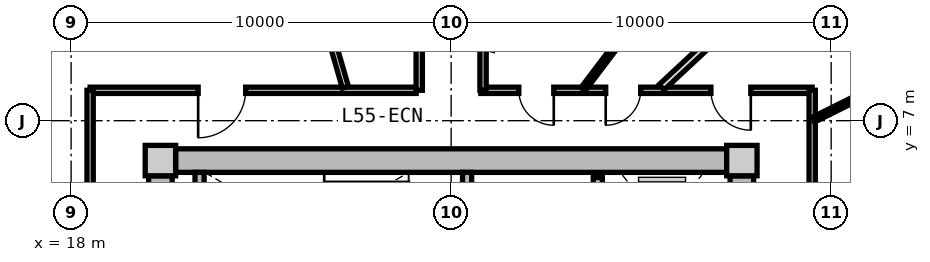
"""IFC4 building model, lengths in metres.
Left out: names, types, materials, properties, quantities, classifications, styles, units other than length and angle.
Written with IfcOpenShell. Run it as: python <this file> out.ifc"""

import sys

from ifc_helpers import new_model, si_unit, direction, frame, frame_2d, origin, origin_2d, place, context, subcontext, project, spatial, rectangle, extrude, source, transform, mapped, element, fill, save


model = new_model("IFC4")
c1 = context("Model", 3, precision=1e-05, world=origin(), true_north=direction((0.0, 1.0)))
c2 = subcontext(c1, "Body", "Model", "MODEL_VIEW")
j1 = project(units=[si_unit("LENGTHUNIT", "METRE"), si_unit("PLANEANGLEUNIT", "RADIAN")], contexts=[c1])
p1 = place(None, origin())
s1 = spatial("IfcSite", under=j1, at=p1, CompositionType="ELEMENT")
p2 = place(p1, origin())
s2 = spatial("IfcBuilding", under=s1, at=p2, CompositionType="ELEMENT")
p3 = place(p2, frame((0.0, 0.0, 177.0)))
s3 = spatial("IfcBuildingStorey", under=s2, at=p3, CompositionType="ELEMENT", Elevation=177.0)
m1 = source(origin(), c2, "Body", "SweptSolid", [
    extrude(rectangle(XDim=0.8, YDim=0.8, at=origin_2d()), origin(), (0.0, 0.0, 1.0), 3.05),
])
for number, where, z_axis, x_axis in (
    (1, (35.65, 5.95, 0.0), (0.0, 0.0, 1.0), (1.0, 0.0, 0.0)),
    (2, (20.35, 5.95, 0.0), (0.0, 0.0, 1.0), (1.0, 0.0, 0.0)),
):
    element("IfcColumn", number, at=place(p3, frame(where, z_axis=z_axis, x_axis=x_axis)), inside=s3, PredefinedType="COLUMN", context=c2, shape_type="MappedRepresentation", body=[
        mapped(m1, transform((0.0, 0.0, 0.0), x_axis=(1.0, 0.0, 0.0), y_axis=(0.0, 1.0, 0.0), z_axis=(0.0, 0.0, 1.0), scale=1.0)),
    ])
m2 = source(origin(), c2, "Body", "SweptSolid", [
    extrude(rectangle(XDim=14.5, YDim=0.62, at=frame_2d((7.25, 0.0))), origin(), (0.0, 0.0, 1.0), 2.81),
])
p4 = place(p3, frame((20.75, 5.95, 0.0), z_axis=(0.0, 0.0, 1.0), x_axis=(1.0, 0.0, 0.0)))
e3 = element("IfcWall", 3, at=p4, inside=s3, PredefinedType="SHEAR", context=c2, shape_type="MappedRepresentation", body=[
    mapped(m2, transform((0.0, 0.0, 0.0), x_axis=(1.0, 0.0, 0.0), y_axis=(0.0, 1.0, 0.0), z_axis=(0.0, 0.0, 1.0), scale=1.0)),
])
m3 = source(origin(), c2, "Body", "SweptSolid", [
    extrude(rectangle(XDim=11.1, YDim=0.62, at=frame_2d((5.55, 0.0))), origin(), (0.0, 0.0, 1.0), 2.81),
])
p5 = place(p3, frame((20.35, -5.55, 0.0), z_axis=(0.0, 0.0, 1.0), x_axis=(0.0, 1.0, 0.0)))
e4 = element("IfcWall", 4, at=p5, inside=s3, PredefinedType="SHEAR", context=c2, shape_type="MappedRepresentation", body=[
    mapped(m3, transform((0.0, 0.0, 0.0), x_axis=(1.0, 0.0, 0.0), y_axis=(0.0, 1.0, 0.0), z_axis=(0.0, 0.0, 1.0), scale=1.0)),
])
p6 = place(p5, frame((3.8, 0.0, 0.0)))
e5 = element("IfcOpeningElement", 5, at=p6, cuts=e4, PredefinedType="OPENING", context=c2, shape_type="SweptSolid", body=[
    extrude(rectangle(XDim=1.2, YDim=2.15, at=frame_2d((0.6, 1.075))), frame((0.0, 0.32, 0.0), z_axis=(0.0, -1.0, 0.0), x_axis=(1.0, 0.0, 0.0)), (0.0, 0.0, 1.0), 0.64),
])
p7 = place(p3, frame((35.65, 5.55, 0.0), z_axis=(0.0, 0.0, 1.0), x_axis=(0.0, -1.0, 0.0)))
e6 = element("IfcWall", 6, at=p7, inside=s3, PredefinedType="SHEAR", context=c2, shape_type="MappedRepresentation", body=[
    mapped(m3, transform((0.0, 0.0, 0.0), x_axis=(1.0, 0.0, 0.0), y_axis=(0.0, 1.0, 0.0), z_axis=(0.0, 0.0, 1.0), scale=1.0)),
])
p8 = place(p7, frame((5.65, 0.0, 0.0)))
e7 = element("IfcOpeningElement", 7, at=p8, cuts=e6, PredefinedType="OPENING", context=c2, shape_type="SweptSolid", body=[
    extrude(rectangle(XDim=1.2, YDim=2.15, at=frame_2d((0.6, 1.075))), frame((0.0, 0.32, 0.0), z_axis=(0.0, -1.0, 0.0), x_axis=(1.0, 0.0, 0.0)), (0.0, 0.0, 1.0), 0.64),
])
m4 = source(origin(), c2, "Body", "SweptSolid", [
    extrude(rectangle(XDim=3.19, YDim=0.24, at=frame_2d((1.595, 0.0))), origin(), (0.0, 0.0, 1.0), 2.81),
])
p9 = place(p3, frame((21.38, 2.45, 0.0), z_axis=(0.0, 0.0, 1.0), x_axis=(0.0, 1.0, 0.0)))
e8 = element("IfcWall", 8, at=p9, inside=s3, PredefinedType="PARTITIONING", context=c2, shape_type="MappedRepresentation", body=[
    mapped(m4, transform((0.0, 0.0, 0.0), x_axis=(1.0, 0.0, 0.0), y_axis=(0.0, 1.0, 0.0), z_axis=(0.0, 0.0, 1.0), scale=1.0)),
])
p10 = place(p3, frame((28.42, 2.45, 0.0), z_axis=(0.0, 0.0, 1.0), x_axis=(0.0, 1.0, 0.0)))
e9 = element("IfcWall", 9, at=p10, inside=s3, PredefinedType="PARTITIONING", context=c2, shape_type="MappedRepresentation", body=[
    mapped(m4, transform((0.0, 0.0, 0.0), x_axis=(1.0, 0.0, 0.0), y_axis=(0.0, 1.0, 0.0), z_axis=(0.0, 0.0, 1.0), scale=1.0)),
])
p11 = place(p10, frame((0.55, 0.0, 0.0)))
e10 = element("IfcOpeningElement", 10, at=p11, cuts=e9, PredefinedType="OPENING", context=c2, shape_type="SweptSolid", body=[
    extrude(rectangle(XDim=1.1, YDim=2.15, at=frame_2d((0.55, 1.075))), frame((0.0, 0.13, 0.0), z_axis=(0.0, -1.0, 0.0), x_axis=(1.0, 0.0, 0.0)), (0.0, 0.0, 1.0), 0.26),
])
m5 = source(origin(), c2, "Body", "SweptSolid", [
    extrude(rectangle(XDim=5.0, YDim=0.24, at=frame_2d((2.5, 0.0))), origin(), (0.0, 0.0, 1.0), 2.795),
])
p12 = place(p3, frame((31.86, 0.5, 0.0), z_axis=(0.0, 0.0, 1.0), x_axis=(0.0, 1.0, 0.0)))
e11 = element("IfcWall", 11, at=p12, inside=s3, PredefinedType="PARTITIONING", context=c2, shape_type="MappedRepresentation", body=[
    mapped(m5, transform((0.0, 0.0, 0.0), x_axis=(1.0, 0.0, 0.0), y_axis=(0.0, 1.0, 0.0), z_axis=(0.0, 0.0, 1.0), scale=1.0)),
])
p13 = place(p12, frame((3.05, 0.0, 0.0)))
e12 = element("IfcOpeningElement", 12, at=p13, cuts=e11, PredefinedType="OPENING", context=c2, shape_type="SweptSolid", body=[
    extrude(rectangle(XDim=1.3, YDim=2.2, at=frame_2d((0.65, 1.1))), frame((0.0, 0.13, 0.0), z_axis=(0.0, -1.0, 0.0), x_axis=(1.0, 0.0, 0.0)), (0.0, 0.0, 1.0), 0.26),
])
p14 = place(p12, frame((0.55, 0.0, 0.0)))
e13 = element("IfcOpeningElement", 13, at=p14, cuts=e11, PredefinedType="OPENING", context=c2, shape_type="SweptSolid", body=[
    extrude(rectangle(XDim=1.3, YDim=2.2, at=frame_2d((0.65, 1.1))), frame((0.0, 0.13, 0.0), z_axis=(0.0, -1.0, 0.0), x_axis=(1.0, 0.0, 0.0)), (0.0, 0.0, 1.0), 0.26),
])
m6 = source(origin(), c2, "Body", "SweptSolid", [
    extrude(rectangle(XDim=8.58, YDim=0.165, at=frame_2d((4.29, 0.0))), origin(), (0.0, 0.0, 1.0), 2.795),
])
p15 = place(p3, frame((18.5, 7.8, 0.0), z_axis=(0.0, 0.0, 1.0), x_axis=(1.0, 0.0, 0.0)))
e14 = element("IfcWall", 14, at=p15, inside=s3, PredefinedType="PARTITIONING", context=c2, shape_type="MappedRepresentation", body=[
    mapped(m6, transform((0.0, 0.0, 0.0), x_axis=(1.0, 0.0, 0.0), y_axis=(0.0, 1.0, 0.0), z_axis=(0.0, 0.0, 1.0), scale=1.0)),
])
p16 = place(p15, frame((2.843, 0.0, 0.0)))
e15 = element("IfcOpeningElement", 15, at=p16, cuts=e14, PredefinedType="OPENING", context=c2, shape_type="SweptSolid", body=[
    extrude(rectangle(XDim=1.25, YDim=2.2, at=frame_2d((0.625, 1.1))), frame((0.0, 0.093, 0.0), z_axis=(0.0, -1.0, 0.0), x_axis=(1.0, 0.0, 0.0)), (0.0, 0.0, 1.0), 0.185),
])
m7 = source(origin(), c2, "Body", "SweptSolid", [
    extrude(rectangle(XDim=8.719, YDim=0.165, at=frame_2d((4.36, 0.0))), origin(), (0.0, 0.0, 1.0), 2.795),
])
p17 = place(p3, frame((28.781, 7.8, 0.0), z_axis=(0.0, 0.0, 1.0), x_axis=(1.0, 0.0, 0.0)))
e16 = element("IfcWall", 16, at=p17, inside=s3, PredefinedType="PARTITIONING", context=c2, shape_type="MappedRepresentation", body=[
    mapped(m7, transform((0.0, 0.0, 0.0), x_axis=(1.0, 0.0, 0.0), y_axis=(0.0, 1.0, 0.0), z_axis=(0.0, 0.0, 1.0), scale=1.0)),
])
p18 = place(p17, frame((6.054, 0.0, 0.0)))
e17 = element("IfcOpeningElement", 17, at=p18, cuts=e16, PredefinedType="OPENING", context=c2, shape_type="SweptSolid", body=[
    extrude(rectangle(XDim=1.05, YDim=2.15, at=frame_2d((0.525, 1.075))), frame((0.0, 0.093, 0.0), z_axis=(0.0, -1.0, 0.0), x_axis=(1.0, 0.0, 0.0)), (0.0, 0.0, 1.0), 0.185),
])
p19 = place(p17, frame((3.287, 0.0, 0.0)))
e18 = element("IfcOpeningElement", 18, at=p19, cuts=e16, PredefinedType="OPENING", context=c2, shape_type="SweptSolid", body=[
    extrude(rectangle(XDim=0.92, YDim=2.1, at=frame_2d((0.46, 1.05))), frame((0.0, 0.093, 0.0), z_axis=(0.0, -1.0, 0.0), x_axis=(1.0, 0.0, 0.0)), (0.0, 0.0, 1.0), 0.185),
])
p20 = place(p17, frame((1.0, 0.0, 0.0)))
e19 = element("IfcOpeningElement", 19, at=p20, cuts=e16, PredefinedType="OPENING", context=c2, shape_type="SweptSolid", body=[
    extrude(rectangle(XDim=0.92, YDim=2.1, at=frame_2d((0.46, 1.05))), frame((0.0, 0.093, 0.0), z_axis=(0.0, -1.0, 0.0), x_axis=(1.0, 0.0, 0.0)), (0.0, 0.0, 1.0), 0.185),
])
m8 = source(origin(), c2, "Body", "SweptSolid", [
    extrude(rectangle(XDim=6.88, YDim=0.165, at=frame_2d((3.44, 0.0))), origin(), (0.0, 0.0, 1.0), 2.795),
])
for number, where, z_axis, x_axis in (
    (20, (18.5, 0.92, 0.0), (0.0, 0.0, 1.0), (0.0, 1.0, 0.0)),
    (21, (37.5, 7.8, 0.0), (0.0, 0.0, 1.0), (0.0, -1.0, 0.0)),
):
    element("IfcWall", number, at=place(p3, frame(where, z_axis=z_axis, x_axis=x_axis)), inside=s3, PredefinedType="PARTITIONING", context=c2, shape_type="MappedRepresentation", body=[
        mapped(m8, transform((0.0, 0.0, 0.0), x_axis=(1.0, 0.0, 0.0), y_axis=(0.0, 1.0, 0.0), z_axis=(0.0, 0.0, 1.0), scale=1.0)),
    ])
m9 = source(origin(), c2, "Body", "SweptSolid", [
    extrude(rectangle(XDim=9.73, YDim=0.165, at=frame_2d((4.865, 0.0))), origin(), (0.0, 0.0, 1.0), 2.345),
])
p21 = place(p3, frame((25.217, 7.88, 0.0), z_axis=(0.0, 0.0, 1.0), x_axis=(-0.27679492614, 0.960929013436, 0.0)))
e22 = element("IfcWall", 22, at=p21, inside=s3, PredefinedType="PARTITIONING", context=c2, shape_type="MappedRepresentation", body=[
    mapped(m9, transform((0.0, 0.0, 0.0), x_axis=(1.0, 0.0, 0.0), y_axis=(0.0, 1.0, 0.0), z_axis=(0.0, 0.0, 1.0), scale=1.0)),
])
m10 = source(origin(), c2, "Body", "SweptSolid", [
    extrude(rectangle(XDim=8.305, YDim=0.165, at=frame_2d((4.153, 0.0))), origin(), (0.0, 0.0, 1.0), 2.345),
])
p22 = place(p3, frame((18.42, 3.908, 0.0), z_axis=(0.0, 0.0, 1.0), x_axis=(-0.970309994378, 0.241864662175, 0.0)))
e23 = element("IfcWall", 23, at=p22, inside=s3, PredefinedType="PARTITIONING", context=c2, shape_type="MappedRepresentation", body=[
    mapped(m10, transform((0.0, 0.0, 0.0), x_axis=(1.0, 0.0, 0.0), y_axis=(0.0, 1.0, 0.0), z_axis=(0.0, 0.0, 1.0), scale=1.0)),
])
m11 = source(origin(), c2, "Body", "SweptSolid", [
    extrude(rectangle(XDim=6.193, YDim=0.165, at=frame_2d((3.096, 0.0))), origin(), (0.0, 0.0, 1.0), 2.345),
])
p23 = place(p3, frame((37.58, 4.419, 0.0), z_axis=(0.0, 0.0, 1.0), x_axis=(0.970309243466, 0.241867674657, 0.0)))
e24 = element("IfcWall", 24, at=p23, inside=s3, PredefinedType="PARTITIONING", context=c2, shape_type="MappedRepresentation", body=[
    mapped(m11, transform((0.0, 0.0, 0.0), x_axis=(1.0, 0.0, 0.0), y_axis=(0.0, 1.0, 0.0), z_axis=(0.0, 0.0, 1.0), scale=1.0)),
])
m12 = source(origin(), c2, "Body", "SweptSolid", [
    extrude(rectangle(XDim=9.48, YDim=0.165, at=frame_2d((4.74, 0.0))), origin(), (0.0, 0.0, 1.0), 2.795),
])
p24 = place(p3, frame((27.16, 7.8, 0.0), z_axis=(0.0, 0.0, 1.0), x_axis=(0.0, 1.0, 0.0)))
e25 = element("IfcWall", 25, at=p24, inside=s3, PredefinedType="PARTITIONING", context=c2, shape_type="MappedRepresentation", body=[
    mapped(m12, transform((0.0, 0.0, 0.0), x_axis=(1.0, 0.0, 0.0), y_axis=(0.0, 1.0, 0.0), z_axis=(0.0, 0.0, 1.0), scale=1.0)),
])
p25 = place(p24, frame((4.265, 0.0, 0.0)))
e26 = element("IfcOpeningElement", 26, at=p25, cuts=e25, PredefinedType="OPENING", context=c2, shape_type="SweptSolid", body=[
    extrude(rectangle(XDim=0.95, YDim=2.1, at=frame_2d((0.475, 1.05))), frame((0.0, 0.093, 0.0), z_axis=(0.0, -1.0, 0.0), x_axis=(1.0, 0.0, 0.0)), (0.0, 0.0, 1.0), 0.185),
])
p26 = place(p3, frame((28.84, 17.28, 0.0), z_axis=(0.0, 0.0, 1.0), x_axis=(0.0, -1.0, 0.0)))
e27 = element("IfcWall", 27, at=p26, inside=s3, PredefinedType="PARTITIONING", context=c2, shape_type="MappedRepresentation", body=[
    mapped(m12, transform((0.0, 0.0, 0.0), x_axis=(1.0, 0.0, 0.0), y_axis=(0.0, 1.0, 0.0), z_axis=(0.0, 0.0, 1.0), scale=1.0)),
])
p27 = place(p26, frame((4.01, 0.0, 0.0)))
e28 = element("IfcOpeningElement", 28, at=p27, cuts=e27, PredefinedType="OPENING", context=c2, shape_type="SweptSolid", body=[
    extrude(rectangle(XDim=0.95, YDim=2.1, at=frame_2d((0.475, 1.05))), frame((0.0, 0.093, 0.0), z_axis=(0.0, -1.0, 0.0), x_axis=(1.0, 0.0, 0.0)), (0.0, 0.0, 1.0), 0.185),
])
m13 = source(origin(), c2, "Body", "SweptSolid", [
    extrude(rectangle(XDim=7.648, YDim=0.19, at=frame_2d((3.824, 0.0))), origin(), (0.0, 0.0, 1.0), 2.345),
])
p28 = place(p3, frame((33.538, 7.88, 0.0), z_axis=(0.0, 0.0, 1.0), x_axis=(0.732167856666, 0.681124239522, 0.0)))
e29 = element("IfcWall", 29, at=p28, inside=s3, PredefinedType="PARTITIONING", context=c2, shape_type="MappedRepresentation", body=[
    mapped(m13, transform((0.0, 0.0, 0.0), x_axis=(1.0, 0.0, 0.0), y_axis=(0.0, 1.0, 0.0), z_axis=(0.0, 0.0, 1.0), scale=1.0)),
])
m14 = source(origin(), c2, "Body", "SweptSolid", [
    extrude(rectangle(XDim=2.471, YDim=0.14, at=frame_2d((1.235, 0.0))), origin(), (0.0, 0.0, 1.0), 2.795),
])
p29 = place(p3, frame((37.53, 7.026, 0.0), z_axis=(0.0, 0.0, 1.0), x_axis=(0.895295102372, 0.445473545419, 0.0)))
e30 = element("IfcWall", 30, at=p29, inside=s3, PredefinedType="PARTITIONING", context=c2, shape_type="MappedRepresentation", body=[
    mapped(m14, transform((0.0, 0.0, 0.0), x_axis=(1.0, 0.0, 0.0), y_axis=(0.0, 1.0, 0.0), z_axis=(0.0, 0.0, 1.0), scale=1.0)),
])
m15 = source(origin(), c2, "Body", "SweptSolid", [
    extrude(rectangle(XDim=8.359, YDim=0.14, at=frame_2d((4.18, 0.0))), origin(), (0.0, 0.0, 1.0), 2.795),
])
p30 = place(p3, frame((31.473, 7.83, 0.0), z_axis=(0.0, 0.0, 1.0), x_axis=(0.603265985309, 0.797540062297, 0.0)))
e31 = element("IfcWall", 31, at=p30, inside=s3, PredefinedType="PARTITIONING", context=c2, shape_type="MappedRepresentation", body=[
    mapped(m15, transform((0.0, 0.0, 0.0), x_axis=(1.0, 0.0, 0.0), y_axis=(0.0, 1.0, 0.0), z_axis=(0.0, 0.0, 1.0), scale=1.0)),
])
m16 = source(origin(), c2, "Body", "SweptSolid", [
    extrude(rectangle(XDim=1.05, YDim=2.15, at=frame_2d((0.525, 1.075))), frame((0.0, 0.025, 0.0), z_axis=(0.0, -1.0, 0.0), x_axis=(1.0, 0.0, 0.0)), (0.0, 0.0, 1.0), 0.05),
])
p31 = place(p18, frame((1.05, 0.0, 0.0), z_axis=(0.0, 0.0, 1.0), x_axis=(-1.0, 0.0, 0.0)))
e32 = element("IfcDoor", 32, at=p31, inside=s3, OperationType="SINGLE_SWING_LEFT", PredefinedType="DOOR", context=c2, shape_type="MappedRepresentation", body=[
    mapped(m16, transform((0.0, 0.0, 0.0), x_axis=(1.0, 0.0, 0.0), y_axis=(0.0, 1.0, 0.0), z_axis=(0.0, 0.0, 1.0), scale=1.0)),
])
fill(e17, e32)
m17 = source(origin(), c2, "Body", "SweptSolid", [
    extrude(rectangle(XDim=0.92, YDim=2.1, at=frame_2d((0.46, 1.05))), frame((0.0, 0.025, 0.0), z_axis=(0.0, -1.0, 0.0), x_axis=(1.0, 0.0, 0.0)), (0.0, 0.0, 1.0), 0.05),
])
p32 = place(p19, frame((0.92, 0.0, 0.0), z_axis=(0.0, 0.0, 1.0), x_axis=(-1.0, 0.0, 0.0)))
e33 = element("IfcDoor", 33, at=p32, inside=s3, OperationType="SINGLE_SWING_RIGHT", PredefinedType="DOOR", context=c2, shape_type="MappedRepresentation", body=[
    mapped(m17, transform((0.0, 0.0, 0.0), x_axis=(1.0, 0.0, 0.0), y_axis=(0.0, 1.0, 0.0), z_axis=(0.0, 0.0, 1.0), scale=1.0)),
])
fill(e18, e33)
p33 = place(p20, frame((0.92, 0.0, 0.0), z_axis=(0.0, 0.0, 1.0), x_axis=(-1.0, 0.0, 0.0)))
e34 = element("IfcDoor", 34, at=p33, inside=s3, OperationType="SINGLE_SWING_LEFT", PredefinedType="DOOR", context=c2, shape_type="MappedRepresentation", body=[
    mapped(m17, transform((0.0, 0.0, 0.0), x_axis=(1.0, 0.0, 0.0), y_axis=(0.0, 1.0, 0.0), z_axis=(0.0, 0.0, 1.0), scale=1.0)),
])
fill(e19, e34)
m18 = source(origin(), c2, "Body", "SweptSolid", [
    extrude(rectangle(XDim=1.25, YDim=2.2, at=frame_2d((0.625, 1.1))), frame((0.0, 0.025, 0.0), z_axis=(0.0, -1.0, 0.0), x_axis=(1.0, 0.0, 0.0)), (0.0, 0.0, 1.0), 0.05),
])
p34 = place(p16, frame((1.25, 0.0, 0.0), z_axis=(0.0, 0.0, 1.0), x_axis=(-1.0, 0.0, 0.0)))
e35 = element("IfcDoor", 35, at=p34, inside=s3, OperationType="SINGLE_SWING_RIGHT", PredefinedType="DOOR", context=c2, shape_type="MappedRepresentation", body=[
    mapped(m18, transform((0.0, 0.0, 0.0), x_axis=(1.0, 0.0, 0.0), y_axis=(0.0, 1.0, 0.0), z_axis=(0.0, 0.0, 1.0), scale=1.0)),
])
fill(e15, e35)
save(model, sys.argv[1])
